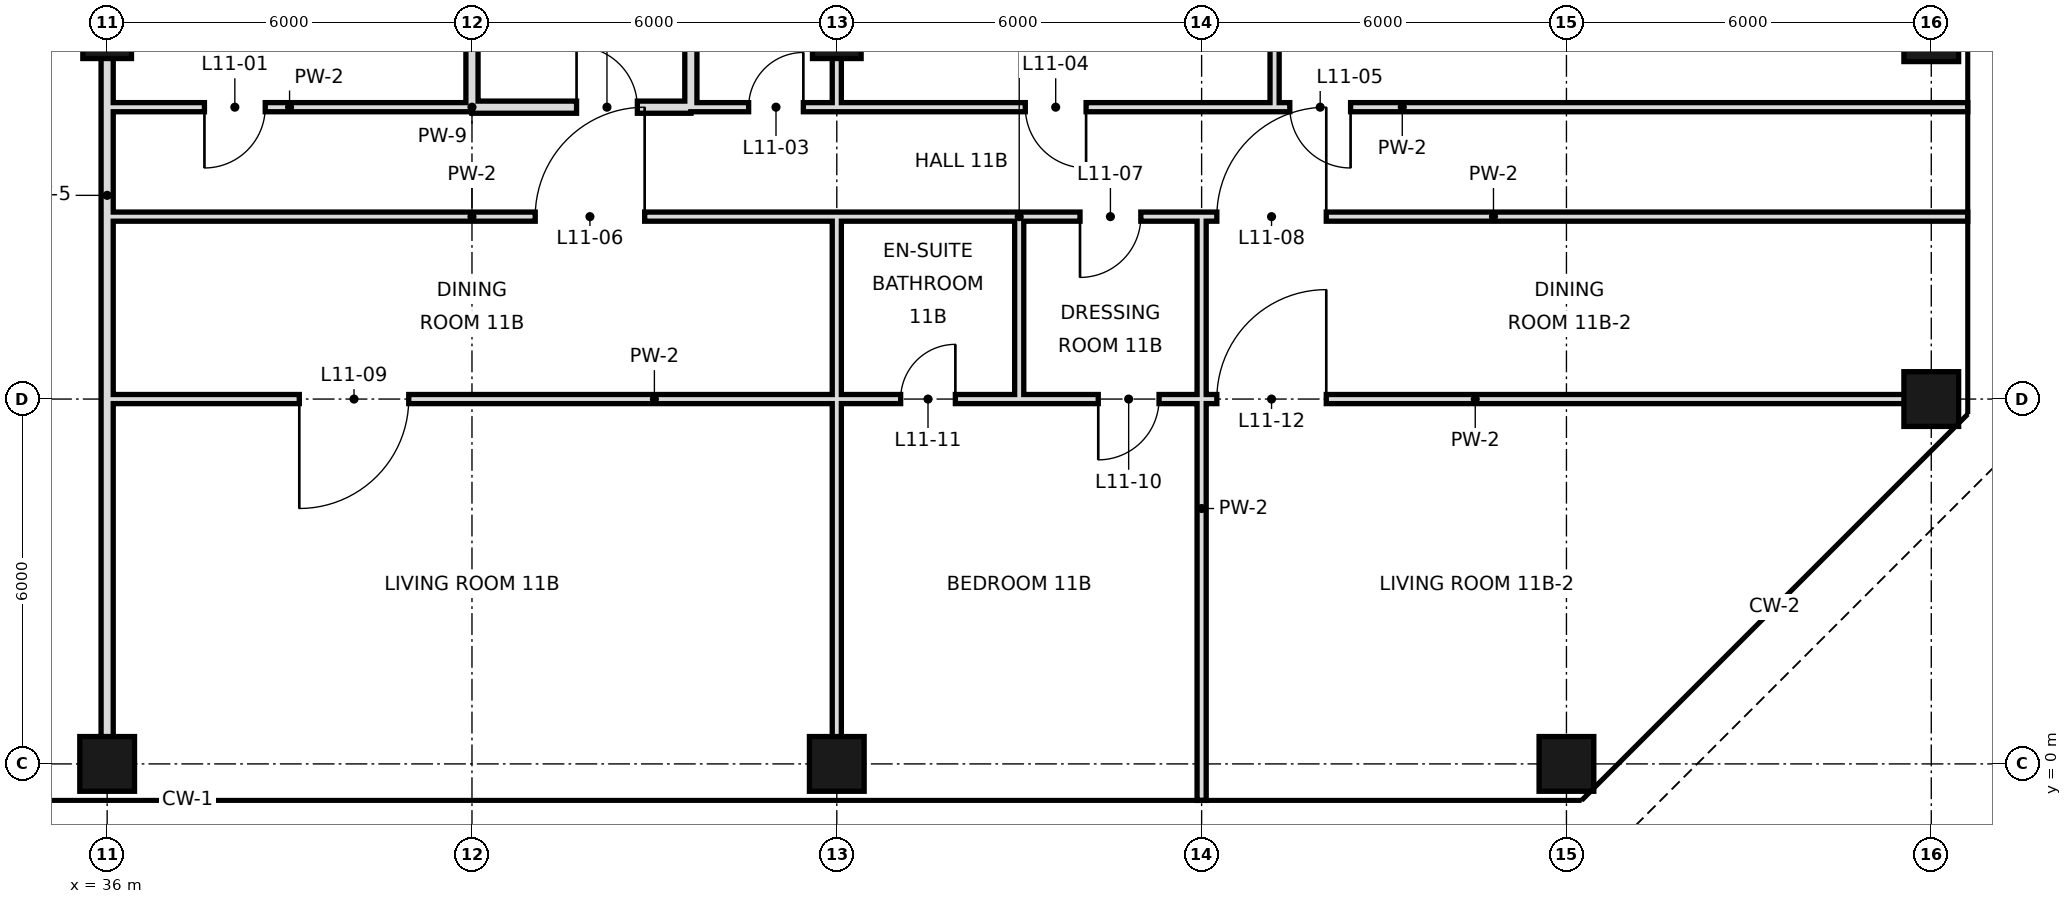
"""IFC4 building model, lengths in metres.
Left out: names, types, materials, properties, quantities, classifications, styles, units other than length and angle.
Written with IfcOpenShell. Run it as: python <this file> out.ifc"""

import sys

from ifc_helpers import new_model, si_unit, direction, frame, frame_2d, origin, origin_2d, place, context, subcontext, project, spatial, rectangle, hollow_rectangle, extrude, element, fill, save


model = new_model("IFC4")
c1 = context("Model", 3, precision=1e-05, world=origin(), true_north=direction((0.0, 1.0)))
c2 = subcontext(c1, "Body", "Model", "MODEL_VIEW")
j1 = project(units=[si_unit("LENGTHUNIT", "METRE"), si_unit("PLANEANGLEUNIT", "RADIAN")], contexts=[c1])
p1 = place(None, origin())
s1 = spatial("IfcSite", under=j1, at=p1, CompositionType="ELEMENT")
p2 = place(p1, origin())
s2 = spatial("IfcBuilding", under=s1, at=p2, CompositionType="ELEMENT")
p3 = place(p2, frame((0.0, 0.0, 60.6)))
s3 = spatial("IfcBuildingStorey", under=s2, at=p3, CompositionType="ELEMENT", Elevation=60.6)
p4 = place(p3, frame((36.0, 0.0, 0.0), z_axis=(0.0, 0.0, 1.0), x_axis=(1.0, 0.0, 0.0)))
e1 = element("IfcColumn", 1, at=p4, inside=s3, PredefinedType="COLUMN", context=c2, shape_type="SweptSolid", body=[
    extrude(hollow_rectangle(XDim=0.9, YDim=0.9, WallThickness=0.045, at=origin_2d()), origin(), (0.0, 0.0, 1.0), 3.6),
])
p5 = place(p3, frame((36.0, 12.0, 0.0), z_axis=(0.0, 0.0, 1.0), x_axis=(1.0, 0.0, 0.0)))
e2 = element("IfcColumn", 2, at=p5, inside=s3, PredefinedType="COLUMN", context=c2, shape_type="SweptSolid", body=[
    extrude(hollow_rectangle(XDim=0.8, YDim=0.8, WallThickness=0.04, at=origin_2d()), origin(), (0.0, 0.0, 1.0), 3.6),
])
p6 = place(p3, frame((48.0, 0.0, 0.0), z_axis=(0.0, 0.0, 1.0), x_axis=(1.0, 0.0, 0.0)))
e3 = element("IfcColumn", 3, at=p6, inside=s3, PredefinedType="COLUMN", context=c2, shape_type="SweptSolid", body=[
    extrude(hollow_rectangle(XDim=0.9, YDim=0.9, WallThickness=0.045, at=origin_2d()), origin(), (0.0, 0.0, 1.0), 3.6),
])
p7 = place(p3, frame((48.0, 12.0, 0.0), z_axis=(0.0, 0.0, 1.0), x_axis=(1.0, 0.0, 0.0)))
e4 = element("IfcColumn", 4, at=p7, inside=s3, PredefinedType="COLUMN", context=c2, shape_type="SweptSolid", body=[
    extrude(hollow_rectangle(XDim=0.8, YDim=0.8, WallThickness=0.04, at=origin_2d()), origin(), (0.0, 0.0, 1.0), 3.6),
])
for number, where, z_axis, x_axis in (
    (5, (60.0, 0.0, 0.0), (0.0, 0.0, 1.0), (1.0, 0.0, 0.0)),
    (6, (66.0, 6.0, 0.0), (0.0, 0.0, 1.0), (1.0, 0.0, 0.0)),
    (7, (66.0, 12.0, 0.0), (0.0, 0.0, 1.0), (1.0, 0.0, 0.0)),
):
    element("IfcColumn", number, at=place(p3, frame(where, z_axis=z_axis, x_axis=x_axis)), inside=s3, PredefinedType="COLUMN", context=c2, shape_type="SweptSolid", body=[
        extrude(hollow_rectangle(XDim=0.9, YDim=0.9, WallThickness=0.045, at=origin_2d()), origin(), (0.0, 0.0, 1.0), 3.6),
    ])
p8 = place(p3, frame((36.0, 0.0, 0.0), z_axis=(0.0, 0.0, 1.0), x_axis=(0.0, 1.0, 0.0)))
e8 = element("IfcWall", 8, at=p8, inside=s3, PredefinedType="SOLIDWALL", context=c2, shape_type="SweptSolid", body=[
    extrude(rectangle(XDim=18.7, YDim=0.2, at=frame_2d((9.35, 0.0))), origin(), (0.0, 0.0, 1.0), 2.72),
])
p9 = place(p3, frame((42.0, 10.8, 0.0), z_axis=(0.0, 0.0, 1.0), x_axis=(0.0, 1.0, 0.0)))
e9 = element("IfcWall", 9, at=p9, inside=s3, PredefinedType="SOLIDWALL", context=c2, shape_type="SweptSolid", body=[
    extrude(rectangle(XDim=7.9, YDim=0.2, at=frame_2d((3.95, 0.0))), origin(), (0.0, 0.0, 1.0), 2.72),
])
p10 = place(p3, frame((45.6, 10.8, 0.0), z_axis=(0.0, 0.0, 1.0), x_axis=(0.0, 1.0, 0.0)))
e10 = element("IfcWall", 10, at=p10, inside=s3, PredefinedType="SOLIDWALL", context=c2, shape_type="SweptSolid", body=[
    extrude(rectangle(XDim=7.2, YDim=0.2, at=frame_2d((3.6, 0.0))), origin(), (0.0, 0.0, 1.0), 2.72),
])
p11 = place(p3, frame((48.0, 0.0, 0.0), z_axis=(0.0, 0.0, 1.0), x_axis=(0.0, 1.0, 0.0)))
e11 = element("IfcWall", 11, at=p11, inside=s3, PredefinedType="PARTITIONING", context=c2, shape_type="SweptSolid", body=[
    extrude(rectangle(XDim=6.0, YDim=0.15, at=frame_2d((3.0, 0.0))), origin(), (0.0, 0.0, 1.0), 2.72),
])
p12 = place(p3, frame((48.0, 6.0, 0.0), z_axis=(0.0, 0.0, 1.0), x_axis=(0.0, 1.0, 0.0)))
e12 = element("IfcWall", 12, at=p12, inside=s3, PredefinedType="PARTITIONING", context=c2, shape_type="SweptSolid", body=[
    extrude(rectangle(XDim=3.0, YDim=0.15, at=frame_2d((1.5, 0.0))), origin(), (0.0, 0.0, 1.0), 2.72),
])
p13 = place(p3, frame((48.0, 10.8, 0.0), z_axis=(0.0, 0.0, 1.0), x_axis=(0.0, 1.0, 0.0)))
e13 = element("IfcWall", 13, at=p13, inside=s3, PredefinedType="PARTITIONING", context=c2, shape_type="SweptSolid", body=[
    extrude(rectangle(XDim=7.2, YDim=0.15, at=frame_2d((3.6, 0.0))), origin(), (0.0, 0.0, 1.0), 2.72),
])
p14 = place(p3, frame((51.0, 6.0, 0.0), z_axis=(0.0, 0.0, 1.0), x_axis=(0.0, 1.0, 0.0)))
e14 = element("IfcWall", 14, at=p14, inside=s3, PredefinedType="PARTITIONING", context=c2, shape_type="SweptSolid", body=[
    extrude(rectangle(XDim=3.0, YDim=0.15, at=frame_2d((1.5, 0.0))), origin(), (0.0, 0.0, 1.0), 3.42),
])
p15 = place(p3, frame((54.0, -0.6, 0.0), z_axis=(0.0, 0.0, 1.0), x_axis=(0.0, 1.0, 0.0)))
e15 = element("IfcWall", 15, at=p15, inside=s3, PredefinedType="PARTITIONING", context=c2, shape_type="SweptSolid", body=[
    extrude(rectangle(XDim=9.6, YDim=0.15, at=frame_2d((4.8, 0.0))), origin(), (0.0, 0.0, 1.0), 3.42),
])
p16 = place(p3, frame((55.2, 10.8, 0.0), z_axis=(0.0, 0.0, 1.0), x_axis=(0.0, 1.0, 0.0)))
e16 = element("IfcWall", 16, at=p16, inside=s3, PredefinedType="PARTITIONING", context=c2, shape_type="SweptSolid", body=[
    extrude(rectangle(XDim=7.2, YDim=0.15, at=frame_2d((3.6, 0.0))), origin(), (0.0, 0.0, 1.0), 3.42),
])
p17 = place(p3, frame((42.0, 10.8, 0.0), z_axis=(0.0, 0.0, 1.0), x_axis=(1.0, 0.0, 0.0)))
e17 = element("IfcWall", 17, at=p17, inside=s3, PredefinedType="SOLIDWALL", context=c2, shape_type="SweptSolid", body=[
    extrude(rectangle(XDim=3.6, YDim=0.2, at=frame_2d((1.8, 0.0))), origin(), (0.0, 0.0, 1.0), 2.72),
])
p18 = place(p17, frame((1.72, 0.0, 0.0)))
e18 = element("IfcOpeningElement", 18, at=p18, cuts=e17, PredefinedType="OPENING", context=c2, shape_type="SweptSolid", body=[
    extrude(rectangle(XDim=1.0, YDim=2.4, at=frame_2d((0.5, 1.2))), frame((0.0, 0.11, 0.0), z_axis=(0.0, -1.0, 0.0), x_axis=(1.0, 0.0, 0.0)), (0.0, 0.0, 1.0), 0.22),
])
p19 = place(p3, frame((36.0, 10.8, 0.0), z_axis=(0.0, 0.0, 1.0), x_axis=(1.0, 0.0, 0.0)))
e19 = element("IfcWall", 19, at=p19, inside=s3, PredefinedType="PARTITIONING", context=c2, shape_type="SweptSolid", body=[
    extrude(rectangle(XDim=6.0, YDim=0.15, at=frame_2d((3.0, 0.0))), origin(), (0.0, 0.0, 1.0), 3.42),
])
p20 = place(p19, frame((1.6, 0.0, 0.0)))
e20 = element("IfcOpeningElement", 20, at=p20, cuts=e19, PredefinedType="OPENING", context=c2, shape_type="SweptSolid", body=[
    extrude(rectangle(XDim=1.0, YDim=2.4, at=frame_2d((0.5, 1.2))), frame((0.0, 0.085, 0.0), z_axis=(0.0, -1.0, 0.0), x_axis=(1.0, 0.0, 0.0)), (0.0, 0.0, 1.0), 0.17),
])
p21 = place(p3, frame((48.0, 10.8, 0.0), z_axis=(0.0, 0.0, 1.0), x_axis=(1.0, 0.0, 0.0)))
e21 = element("IfcWall", 21, at=p21, inside=s3, PredefinedType="PARTITIONING", context=c2, shape_type="SweptSolid", body=[
    extrude(rectangle(XDim=18.6, YDim=0.15, at=frame_2d((9.3, 0.0))), origin(), (0.0, 0.0, 1.0), 3.42),
])
p22 = place(p21, frame((3.1, 0.0, 0.0)))
e22 = element("IfcOpeningElement", 22, at=p22, cuts=e21, PredefinedType="OPENING", context=c2, shape_type="SweptSolid", body=[
    extrude(rectangle(XDim=1.0, YDim=2.4, at=frame_2d((0.5, 1.2))), frame((0.0, 0.085, 0.0), z_axis=(0.0, -1.0, 0.0), x_axis=(1.0, 0.0, 0.0)), (0.0, 0.0, 1.0), 0.17),
])
p23 = place(p21, frame((7.45, 0.0, 0.0)))
e23 = element("IfcOpeningElement", 23, at=p23, cuts=e21, PredefinedType="OPENING", context=c2, shape_type="SweptSolid", body=[
    extrude(rectangle(XDim=1.0, YDim=2.4, at=frame_2d((0.5, 1.2))), frame((0.0, 0.085, 0.0), z_axis=(0.0, -1.0, 0.0), x_axis=(1.0, 0.0, 0.0)), (0.0, 0.0, 1.0), 0.17),
])
p24 = place(p3, frame((45.6, 10.8, 0.0), z_axis=(0.0, 0.0, 1.0), x_axis=(1.0, 0.0, 0.0)))
e24 = element("IfcWall", 24, at=p24, inside=s3, PredefinedType="PARTITIONING", context=c2, shape_type="SweptSolid", body=[
    extrude(rectangle(XDim=2.4, YDim=0.15, at=frame_2d((1.2, 0.0))), origin(), (0.0, 0.0, 1.0), 3.42),
])
p25 = place(p24, frame((0.95, 0.0, 0.0)))
e25 = element("IfcOpeningElement", 25, at=p25, cuts=e24, PredefinedType="OPENING", context=c2, shape_type="SweptSolid", body=[
    extrude(rectangle(XDim=0.9, YDim=2.4, at=frame_2d((0.45, 1.2))), frame((0.0, 0.085, 0.0), z_axis=(0.0, -1.0, 0.0), x_axis=(1.0, 0.0, 0.0)), (0.0, 0.0, 1.0), 0.17),
])
p26 = place(p3, frame((36.0, 6.0, 0.0), z_axis=(0.0, 0.0, 1.0), x_axis=(1.0, 0.0, 0.0)))
e26 = element("IfcWall", 26, at=p26, inside=s3, PredefinedType="PARTITIONING", context=c2, shape_type="SweptSolid", body=[
    extrude(rectangle(XDim=12.0, YDim=0.15, at=frame_2d((6.0, 0.0))), origin(), (0.0, 0.0, 1.0), 2.97),
])
p27 = place(p26, frame((3.16, 0.0, 0.0)))
e27 = element("IfcOpeningElement", 27, at=p27, cuts=e26, PredefinedType="OPENING", context=c2, shape_type="SweptSolid", body=[
    extrude(rectangle(XDim=1.8, YDim=2.4, at=frame_2d((0.9, 1.2))), frame((0.0, 0.085, 0.0), z_axis=(0.0, -1.0, 0.0), x_axis=(1.0, 0.0, 0.0)), (0.0, 0.0, 1.0), 0.17),
])
p28 = place(p3, frame((51.0, 6.0, 0.0), z_axis=(0.0, 0.0, 1.0), x_axis=(1.0, 0.0, 0.0)))
e28 = element("IfcWall", 28, at=p28, inside=s3, PredefinedType="PARTITIONING", context=c2, shape_type="SweptSolid", body=[
    extrude(rectangle(XDim=15.0, YDim=0.15, at=frame_2d((7.5, 0.0))), origin(), (0.0, 0.0, 1.0), 2.52),
])
p29 = place(p28, frame((1.3, 0.0, 0.0)))
e29 = element("IfcOpeningElement", 29, at=p29, cuts=e28, PredefinedType="OPENING", context=c2, shape_type="SweptSolid", body=[
    extrude(rectangle(XDim=1.0, YDim=2.4, at=frame_2d((0.5, 1.2))), frame((0.0, 0.085, 0.0), z_axis=(0.0, -1.0, 0.0), x_axis=(1.0, 0.0, 0.0)), (0.0, 0.0, 1.0), 0.17),
])
p30 = place(p28, frame((3.25, 0.0, 0.0)))
e30 = element("IfcOpeningElement", 30, at=p30, cuts=e28, PredefinedType="OPENING", context=c2, shape_type="SweptSolid", body=[
    extrude(rectangle(XDim=1.8, YDim=2.4, at=frame_2d((0.9, 1.2))), frame((0.0, 0.085, 0.0), z_axis=(0.0, -1.0, 0.0), x_axis=(1.0, 0.0, 0.0)), (0.0, 0.0, 1.0), 0.17),
])
p31 = place(p3, frame((48.0, 6.0, 0.0), z_axis=(0.0, 0.0, 1.0), x_axis=(1.0, 0.0, 0.0)))
e31 = element("IfcWall", 31, at=p31, inside=s3, PredefinedType="PARTITIONING", context=c2, shape_type="SweptSolid", body=[
    extrude(rectangle(XDim=3.0, YDim=0.15, at=frame_2d((1.5, 0.0))), origin(), (0.0, 0.0, 1.0), 2.52),
])
p32 = place(p31, frame((1.05, 0.0, 0.0)))
e32 = element("IfcOpeningElement", 32, at=p32, cuts=e31, PredefinedType="OPENING", context=c2, shape_type="SweptSolid", body=[
    extrude(rectangle(XDim=0.9, YDim=2.4, at=frame_2d((0.45, 1.2))), frame((0.0, 0.085, 0.0), z_axis=(0.0, -1.0, 0.0), x_axis=(1.0, 0.0, 0.0)), (0.0, 0.0, 1.0), 0.17),
])
p33 = place(p3, frame((36.0, 9.0, 0.0), z_axis=(0.0, 0.0, 1.0), x_axis=(1.0, 0.0, 0.0)))
e33 = element("IfcWall", 33, at=p33, inside=s3, PredefinedType="PARTITIONING", context=c2, shape_type="SweptSolid", body=[
    extrude(rectangle(XDim=12.0, YDim=0.15, at=frame_2d((6.0, 0.0))), origin(), (0.0, 0.0, 1.0), 3.42),
])
p34 = place(p33, frame((7.04, 0.0, 0.0)))
e34 = element("IfcOpeningElement", 34, at=p34, cuts=e33, PredefinedType="OPENING", context=c2, shape_type="SweptSolid", body=[
    extrude(rectangle(XDim=1.8, YDim=2.4, at=frame_2d((0.9, 1.2))), frame((0.0, 0.085, 0.0), z_axis=(0.0, -1.0, 0.0), x_axis=(1.0, 0.0, 0.0)), (0.0, 0.0, 1.0), 0.17),
])
p35 = place(p3, frame((51.0, 9.0, 0.0), z_axis=(0.0, 0.0, 1.0), x_axis=(1.0, 0.0, 0.0)))
e35 = element("IfcWall", 35, at=p35, inside=s3, PredefinedType="PARTITIONING", context=c2, shape_type="SweptSolid", body=[
    extrude(rectangle(XDim=15.6, YDim=0.15, at=frame_2d((7.8, 0.0))), origin(), (0.0, 0.0, 1.0), 3.42),
])
p36 = place(p35, frame((1.0, 0.0, 0.0)))
e36 = element("IfcOpeningElement", 36, at=p36, cuts=e35, PredefinedType="OPENING", context=c2, shape_type="SweptSolid", body=[
    extrude(rectangle(XDim=1.0, YDim=2.4, at=frame_2d((0.5, 1.2))), frame((0.0, 0.085, 0.0), z_axis=(0.0, -1.0, 0.0), x_axis=(1.0, 0.0, 0.0)), (0.0, 0.0, 1.0), 0.17),
])
p37 = place(p35, frame((3.25, 0.0, 0.0)))
e37 = element("IfcOpeningElement", 37, at=p37, cuts=e35, PredefinedType="OPENING", context=c2, shape_type="SweptSolid", body=[
    extrude(rectangle(XDim=1.8, YDim=2.4, at=frame_2d((0.9, 1.2))), frame((0.0, 0.085, 0.0), z_axis=(0.0, -1.0, 0.0), x_axis=(1.0, 0.0, 0.0)), (0.0, 0.0, 1.0), 0.17),
])
p38 = place(p3, frame((48.0, 9.0, 0.0), z_axis=(0.0, 0.0, 1.0), x_axis=(1.0, 0.0, 0.0)))
e38 = element("IfcWall", 38, at=p38, inside=s3, PredefinedType="PARTITIONING", context=c2, shape_type="SweptSolid", body=[
    extrude(rectangle(XDim=3.0, YDim=0.15, at=frame_2d((1.5, 0.0))), origin(), (0.0, 0.0, 1.0), 3.42),
])
p39 = place(p20, frame((1.0, 0.0, 0.0), z_axis=(0.0, 0.0, 1.0), x_axis=(-1.0, 0.0, 0.0)))
e39 = element("IfcDoor", 39, at=p39, inside=s3, OperationType="SINGLE_SWING_RIGHT", PredefinedType="DOOR", context=c2, shape_type="SweptSolid", body=[
    extrude(rectangle(XDim=1.0, YDim=2.4, at=frame_2d((0.5, 1.2))), frame((0.0, 0.025, 0.0), z_axis=(0.0, -1.0, 0.0), x_axis=(1.0, 0.0, 0.0)), (0.0, 0.0, 1.0), 0.05),
])
fill(e20, e39)
p40 = place(p18, origin())
e40 = element("IfcDoor", 40, at=p40, inside=s3, OperationType="SINGLE_SWING_LEFT", PredefinedType="DOOR", context=c2, shape_type="SweptSolid", body=[
    extrude(rectangle(XDim=1.0, YDim=2.4, at=frame_2d((0.5, 1.2))), frame((0.0, 0.025, 0.0), z_axis=(0.0, -1.0, 0.0), x_axis=(1.0, 0.0, 0.0)), (0.0, 0.0, 1.0), 0.05),
])
fill(e18, e40)
p41 = place(p25, frame((0.9, 0.0, 0.0), z_axis=(0.0, 0.0, 1.0), x_axis=(-1.0, 0.0, 0.0)))
e41 = element("IfcDoor", 41, at=p41, inside=s3, OperationType="SINGLE_SWING_LEFT", PredefinedType="DOOR", context=c2, shape_type="SweptSolid", body=[
    extrude(rectangle(XDim=0.9, YDim=2.4, at=frame_2d((0.45, 1.2))), frame((0.0, 0.025, 0.0), z_axis=(0.0, -1.0, 0.0), x_axis=(1.0, 0.0, 0.0)), (0.0, 0.0, 1.0), 0.05),
])
fill(e25, e41)
p42 = place(p22, origin())
e42 = element("IfcDoor", 42, at=p42, inside=s3, OperationType="SINGLE_SWING_RIGHT", PredefinedType="DOOR", context=c2, shape_type="SweptSolid", body=[
    extrude(rectangle(XDim=1.0, YDim=2.4, at=frame_2d((0.5, 1.2))), frame((0.0, 0.025, 0.0), z_axis=(0.0, -1.0, 0.0), x_axis=(1.0, 0.0, 0.0)), (0.0, 0.0, 1.0), 0.05),
])
fill(e22, e42)
p43 = place(p23, origin())
e43 = element("IfcDoor", 43, at=p43, inside=s3, OperationType="SINGLE_SWING_RIGHT", PredefinedType="DOOR", context=c2, shape_type="SweptSolid", body=[
    extrude(rectangle(XDim=1.0, YDim=2.4, at=frame_2d((0.5, 1.2))), frame((0.0, 0.025, 0.0), z_axis=(0.0, -1.0, 0.0), x_axis=(1.0, 0.0, 0.0)), (0.0, 0.0, 1.0), 0.05),
])
fill(e23, e43)
p44 = place(p34, frame((1.8, 0.0, 0.0), z_axis=(0.0, 0.0, 1.0), x_axis=(-1.0, 0.0, 0.0)))
e44 = element("IfcDoor", 44, at=p44, inside=s3, OperationType="SINGLE_SWING_LEFT", PredefinedType="DOOR", context=c2, shape_type="SweptSolid", body=[
    extrude(rectangle(XDim=1.8, YDim=2.4, at=frame_2d((0.9, 1.2))), frame((0.0, 0.025, 0.0), z_axis=(0.0, -1.0, 0.0), x_axis=(1.0, 0.0, 0.0)), (0.0, 0.0, 1.0), 0.05),
])
fill(e34, e44)
p45 = place(p36, frame((1.0, 0.0, 0.0), z_axis=(0.0, 0.0, 1.0), x_axis=(-1.0, 0.0, 0.0)))
e45 = element("IfcDoor", 45, at=p45, inside=s3, OperationType="SINGLE_SWING_RIGHT", PredefinedType="DOOR", context=c2, shape_type="SweptSolid", body=[
    extrude(rectangle(XDim=1.0, YDim=2.4, at=frame_2d((0.5, 1.2))), frame((0.0, 0.025, 0.0), z_axis=(0.0, -1.0, 0.0), x_axis=(1.0, 0.0, 0.0)), (0.0, 0.0, 1.0), 0.05),
])
fill(e36, e45)
p46 = place(p37, frame((1.8, 0.0, 0.0), z_axis=(0.0, 0.0, 1.0), x_axis=(-1.0, 0.0, 0.0)))
e46 = element("IfcDoor", 46, at=p46, inside=s3, OperationType="SINGLE_SWING_LEFT", PredefinedType="DOOR", context=c2, shape_type="SweptSolid", body=[
    extrude(rectangle(XDim=1.8, YDim=2.4, at=frame_2d((0.9, 1.2))), frame((0.0, 0.025, 0.0), z_axis=(0.0, -1.0, 0.0), x_axis=(1.0, 0.0, 0.0)), (0.0, 0.0, 1.0), 0.05),
])
fill(e37, e46)
p47 = place(p27, frame((1.8, 0.0, 0.0), z_axis=(0.0, 0.0, 1.0), x_axis=(-1.0, 0.0, 0.0)))
e47 = element("IfcDoor", 47, at=p47, inside=s3, OperationType="SINGLE_SWING_RIGHT", PredefinedType="DOOR", context=c2, shape_type="SweptSolid", body=[
    extrude(rectangle(XDim=1.8, YDim=2.4, at=frame_2d((0.9, 1.2))), frame((0.0, 0.025, 0.0), z_axis=(0.0, -1.0, 0.0), x_axis=(1.0, 0.0, 0.0)), (0.0, 0.0, 1.0), 0.05),
])
fill(e27, e47)
p48 = place(p29, frame((1.0, 0.0, 0.0), z_axis=(0.0, 0.0, 1.0), x_axis=(-1.0, 0.0, 0.0)))
e48 = element("IfcDoor", 48, at=p48, inside=s3, OperationType="SINGLE_SWING_RIGHT", PredefinedType="DOOR", context=c2, shape_type="SweptSolid", body=[
    extrude(rectangle(XDim=1.0, YDim=2.4, at=frame_2d((0.5, 1.2))), frame((0.0, 0.025, 0.0), z_axis=(0.0, -1.0, 0.0), x_axis=(1.0, 0.0, 0.0)), (0.0, 0.0, 1.0), 0.05),
])
fill(e29, e48)
p49 = place(p32, frame((0.9, 0.0, 0.0), z_axis=(0.0, 0.0, 1.0), x_axis=(-1.0, 0.0, 0.0)))
e49 = element("IfcDoor", 49, at=p49, inside=s3, OperationType="SINGLE_SWING_LEFT", PredefinedType="DOOR", context=c2, shape_type="SweptSolid", body=[
    extrude(rectangle(XDim=0.9, YDim=2.4, at=frame_2d((0.45, 1.2))), frame((0.0, 0.025, 0.0), z_axis=(0.0, -1.0, 0.0), x_axis=(1.0, 0.0, 0.0)), (0.0, 0.0, 1.0), 0.05),
])
fill(e32, e49)
p50 = place(p30, frame((1.8, 0.0, 0.0), z_axis=(0.0, 0.0, 1.0), x_axis=(-1.0, 0.0, 0.0)))
e50 = element("IfcDoor", 50, at=p50, inside=s3, OperationType="SINGLE_SWING_LEFT", PredefinedType="DOOR", context=c2, shape_type="SweptSolid", body=[
    extrude(rectangle(XDim=1.8, YDim=2.4, at=frame_2d((0.9, 1.2))), frame((0.0, 0.025, 0.0), z_axis=(0.0, -1.0, 0.0), x_axis=(1.0, 0.0, 0.0)), (0.0, 0.0, 1.0), 0.05),
])
fill(e30, e50)
save(model, sys.argv[1])
